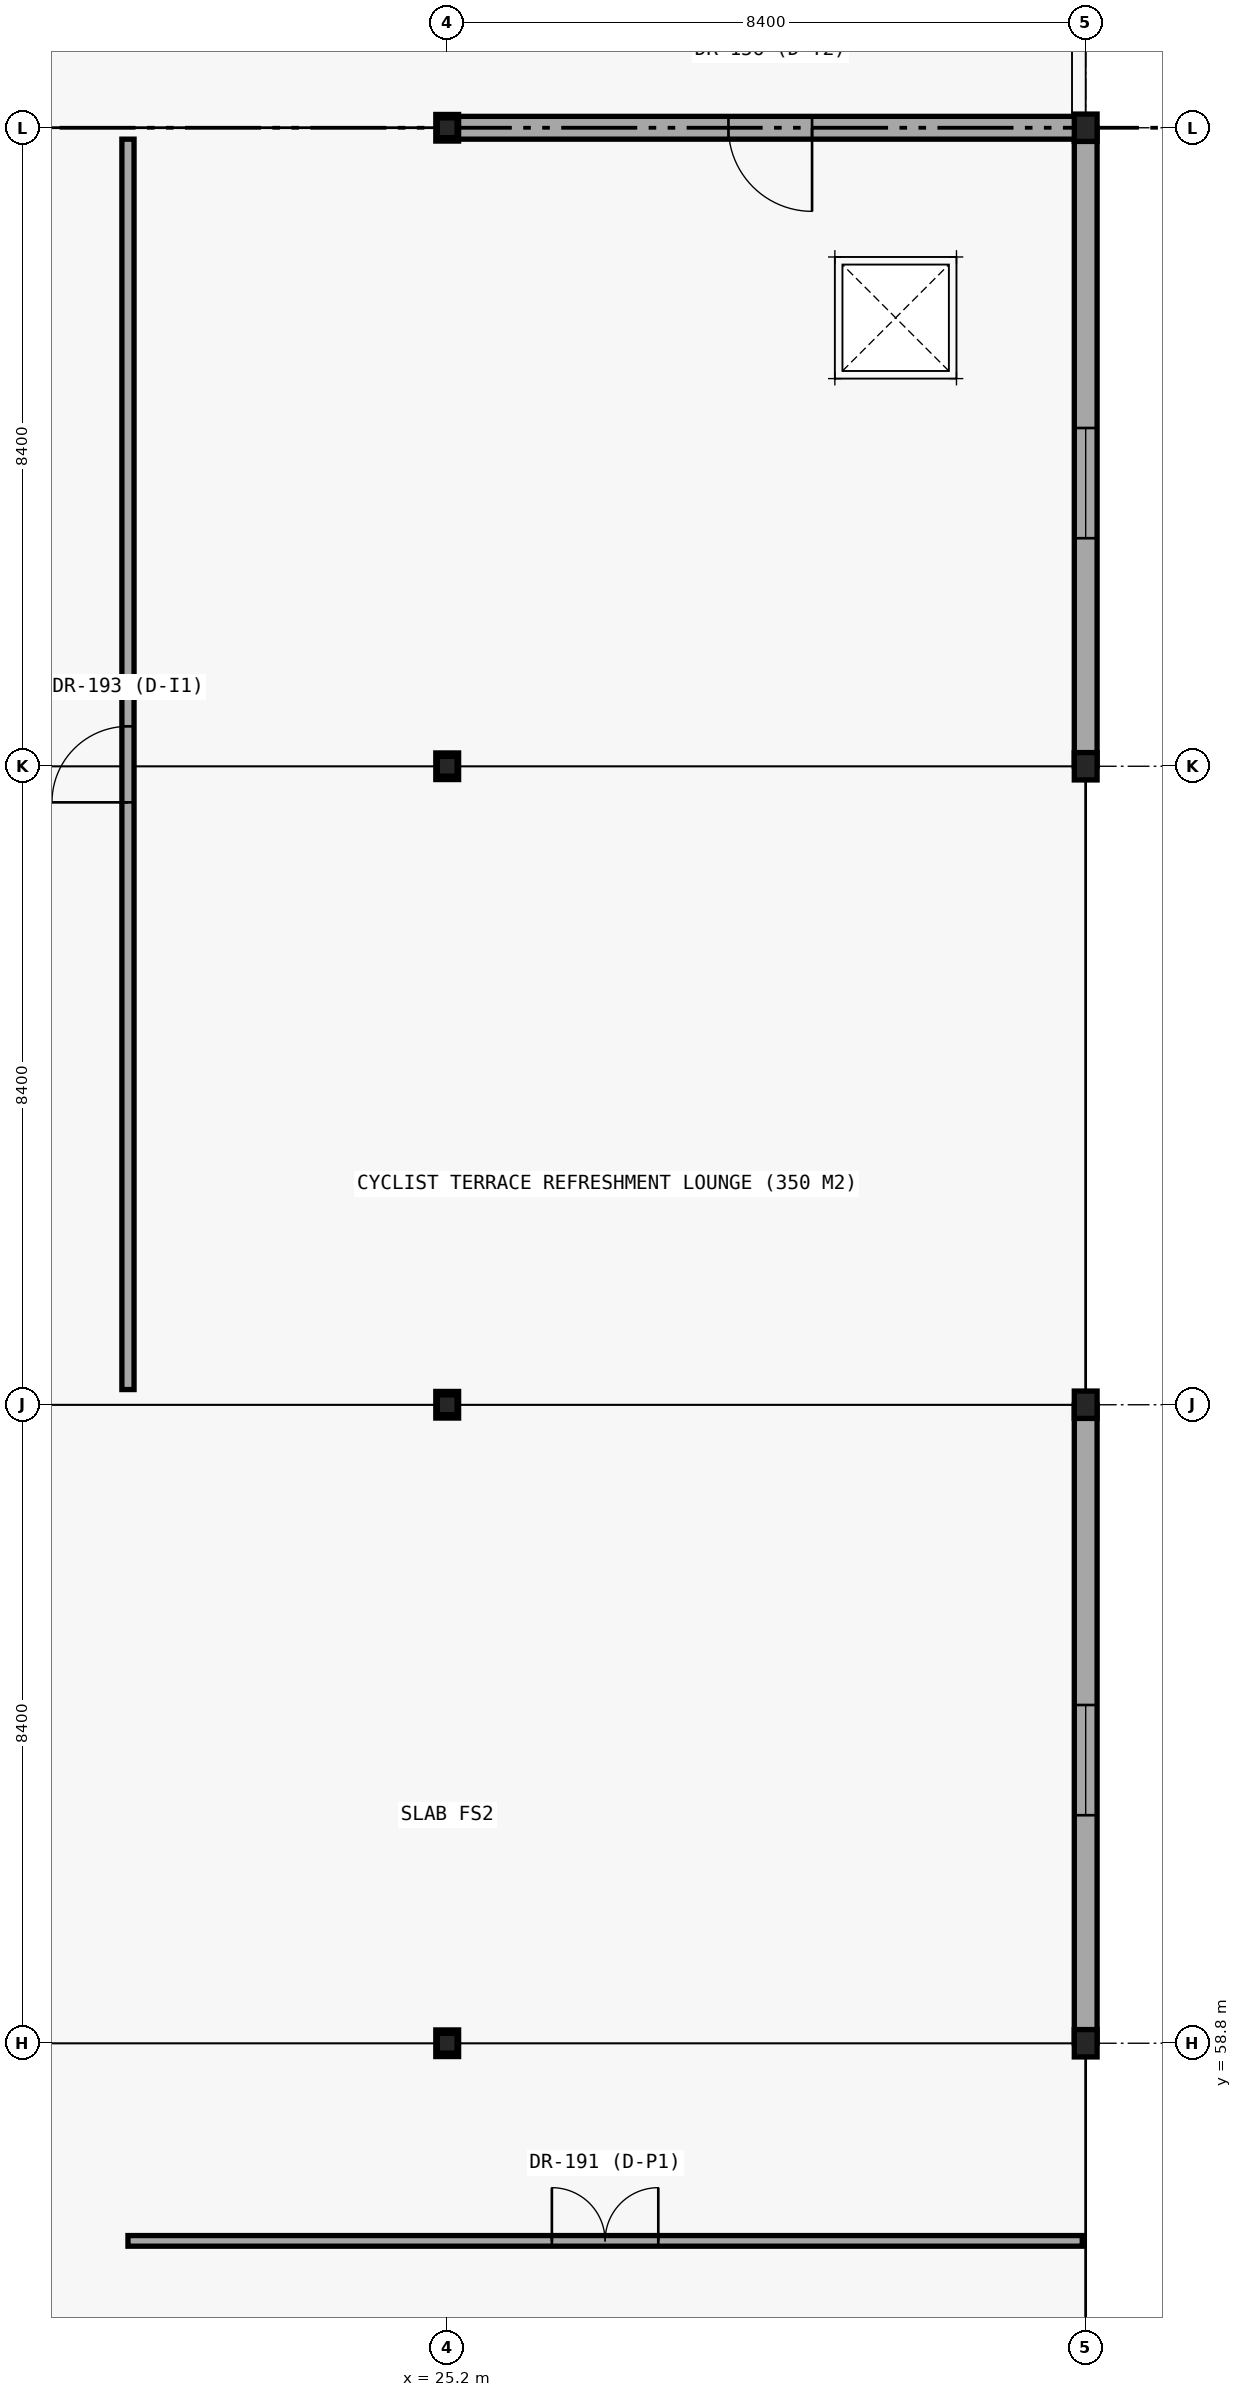
"""IFC4 building model, lengths in metres.
Left out: names, types, materials, properties, quantities, classifications, styles, units other than length and angle.
Written with IfcOpenShell. Run it as: python <this file> out.ifc"""

import sys

from ifc_helpers import new_model, si_unit, direction, frame, frame_2d, origin, origin_2d, place, context, subcontext, project, spatial, rectangle, i_section, extrude, element, fill, save


model = new_model("IFC4")
c1 = context("Model", 3, precision=1e-05, world=origin(), true_north=direction((0.0, 1.0)))
c2 = subcontext(c1, "Body", "Model", "MODEL_VIEW")
j1 = project(units=[si_unit("LENGTHUNIT", "METRE"), si_unit("PLANEANGLEUNIT", "RADIAN")], contexts=[c1])
p1 = place(None, origin())
s1 = spatial("IfcSite", under=j1, at=p1, CompositionType="ELEMENT")
p2 = place(p1, origin())
s2 = spatial("IfcBuilding", under=s1, at=p2, CompositionType="ELEMENT")
p3 = place(p2, frame((0.0, 0.0, 9.0)))
s3 = spatial("IfcBuildingStorey", under=s2, at=p3, CompositionType="ELEMENT", Elevation=9.0)
for number, where, z_axis, x_axis in (
    (1, (25.2, 58.8, 0.0), (0.0, 0.0, 1.0), (1.0, 0.0, 0.0)),
    (2, (25.2, 67.2, 0.0), (0.0, 0.0, 1.0), (1.0, 0.0, 0.0)),
    (3, (25.2, 75.6, 0.0), (0.0, 0.0, 1.0), (1.0, 0.0, 0.0)),
    (4, (25.2, 84.0, 0.0), (0.0, 0.0, 1.0), (1.0, 0.0, 0.0)),
):
    element("IfcColumn", number, at=place(p3, frame(where, z_axis=z_axis, x_axis=x_axis)), inside=s3, PredefinedType="COLUMN", context=c2, shape_type="SweptSolid", body=[
        extrude(i_section(OverallWidth=0.3, OverallDepth=0.35, WebThickness=0.01, FlangeThickness=0.018, FilletRadius=0.027, at=origin_2d()), origin(), (0.0, 0.0, 1.0), 4.03),
    ])
for number, where, z_axis, x_axis in (
    (5, (33.6, 58.8, 0.0), (0.0, 0.0, 1.0), (1.0, 0.0, 0.0)),
    (6, (33.6, 67.2, 0.0), (0.0, 0.0, 1.0), (1.0, 0.0, 0.0)),
    (7, (33.6, 75.6, 0.0), (0.0, 0.0, 1.0), (1.0, 0.0, 0.0)),
    (8, (33.6, 84.0, 0.0), (0.0, 0.0, 1.0), (1.0, 0.0, 0.0)),
):
    element("IfcColumn", number, at=place(p3, frame(where, z_axis=z_axis, x_axis=x_axis)), inside=s3, PredefinedType="COLUMN", context=c2, shape_type="SweptSolid", body=[
        extrude(i_section(OverallWidth=0.3, OverallDepth=0.36, WebThickness=0.012, FlangeThickness=0.022, FilletRadius=0.027, at=origin_2d()), origin(), (0.0, 0.0, 1.0), 4.03),
    ])
for number, where, z_axis, x_axis in (
    (9, (25.2, 58.8, 4.03), (0.0, 0.0, 1.0), (1.0, 0.0, 0.0)),
    (10, (25.2, 67.2, 4.03), (0.0, 0.0, 1.0), (1.0, 0.0, 0.0)),
    (11, (25.2, 75.6, 4.03), (0.0, 0.0, 1.0), (1.0, 0.0, 0.0)),
    (12, (25.2, 84.0, 4.03), (0.0, 0.0, 1.0), (1.0, 0.0, 0.0)),
):
    element("IfcColumn", number, at=place(p3, frame(where, z_axis=z_axis, x_axis=x_axis)), inside=s3, PredefinedType="COLUMN", context=c2, shape_type="SweptSolid", body=[
        extrude(i_section(OverallWidth=0.26, OverallDepth=0.26, WebThickness=0.01, FlangeThickness=0.018, FilletRadius=0.024, at=origin_2d()), origin(), (0.0, 0.0, 1.0), 1.31),
    ])
p4 = place(p3, frame((33.6, 58.8, 0.0), z_axis=(0.0, 0.0, 1.0), x_axis=(0.0, 1.0, 0.0)))
e13 = element("IfcWall", 13, at=p4, inside=s3, PredefinedType="STANDARD", context=c2, shape_type="SweptSolid", body=[
    extrude(rectangle(XDim=8.4, YDim=0.3, at=frame_2d((4.2, 0.0))), origin(), (0.0, 0.0, 1.0), 3.46),
])
p5 = place(p4, frame((3.0, 0.0, 2.1)))
e14 = element("IfcOpeningElement", 14, at=p5, cuts=e13, PredefinedType="OPENING", context=c2, shape_type="SweptSolid", body=[
    extrude(rectangle(XDim=1.45, YDim=0.95, at=frame_2d((0.725, 0.475))), frame((0.0, 0.16, 0.0), z_axis=(0.0, -1.0, 0.0), x_axis=(1.0, 0.0, 0.0)), (0.0, 0.0, 1.0), 0.32),
])
p6 = place(p3, frame((33.6, 75.6, 0.0), z_axis=(0.0, 0.0, 1.0), x_axis=(0.0, 1.0, 0.0)))
e15 = element("IfcWall", 15, at=p6, inside=s3, PredefinedType="STANDARD", context=c2, shape_type="SweptSolid", body=[
    extrude(rectangle(XDim=8.4, YDim=0.3, at=frame_2d((4.2, 0.0))), origin(), (0.0, 0.0, 1.0), 3.46),
])
p7 = place(p6, frame((3.0, 0.0, 2.1)))
e16 = element("IfcOpeningElement", 16, at=p7, cuts=e15, PredefinedType="OPENING", context=c2, shape_type="SweptSolid", body=[
    extrude(rectangle(XDim=1.45, YDim=0.95, at=frame_2d((0.725, 0.475))), frame((0.0, 0.16, 0.0), z_axis=(0.0, -1.0, 0.0), x_axis=(1.0, 0.0, 0.0)), (0.0, 0.0, 1.0), 0.32),
])
p8 = place(p3, frame((33.6, 84.0, 0.0), z_axis=(0.0, 0.0, 1.0), x_axis=(-1.0, 0.0, 0.0)))
e17 = element("IfcWall", 17, at=p8, inside=s3, PredefinedType="STANDARD", context=c2, shape_type="SweptSolid", body=[
    extrude(rectangle(XDim=8.4, YDim=0.3, at=frame_2d((4.2, 0.0))), origin(), (0.0, 0.0, 1.0), 3.46),
])
p9 = place(p8, frame((3.6, 0.0, 0.0)))
e18 = element("IfcOpeningElement", 18, at=p9, cuts=e17, PredefinedType="OPENING", context=c2, shape_type="SweptSolid", body=[
    extrude(rectangle(XDim=1.1, YDim=2.2, at=frame_2d((0.55, 1.1))), frame((0.0, 0.16, 0.0), z_axis=(0.0, -1.0, 0.0), x_axis=(1.0, 0.0, 0.0)), (0.0, 0.0, 1.0), 0.32),
])
p10 = place(p3, frame((21.0, 56.2, 0.0), z_axis=(0.0, 0.0, 1.0), x_axis=(1.0, 0.0, 0.0)))
e19 = element("IfcWall", 19, at=p10, inside=s3, PredefinedType="PARTITIONING", context=c2, shape_type="SweptSolid", body=[
    extrude(rectangle(XDim=12.555, YDim=0.14, at=frame_2d((6.277, 0.0))), origin(), (0.0, 0.0, 1.0), 3.5),
])
p11 = place(p10, frame((5.577, 0.0, 0.0)))
e20 = element("IfcOpeningElement", 20, at=p11, cuts=e19, PredefinedType="OPENING", context=c2, shape_type="SweptSolid", body=[
    extrude(rectangle(XDim=1.4, YDim=2.25, at=frame_2d((0.7, 1.125))), frame((0.0, 0.08, 0.0), z_axis=(0.0, -1.0, 0.0), x_axis=(1.0, 0.0, 0.0)), (0.0, 0.0, 1.0), 0.16),
])
p12 = place(p3, frame((21.0, 67.4, 0.0), z_axis=(0.0, 0.0, 1.0), x_axis=(0.0, 1.0, 0.0)))
e21 = element("IfcWall", 21, at=p12, inside=s3, PredefinedType="PARTITIONING", context=c2, shape_type="SweptSolid", body=[
    extrude(rectangle(XDim=16.45, YDim=0.16, at=frame_2d((8.225, 0.0))), origin(), (0.0, 0.0, 1.0), 3.5),
])
p13 = place(p12, frame((7.725, 0.0, 0.0)))
e22 = element("IfcOpeningElement", 22, at=p13, cuts=e21, PredefinedType="OPENING", context=c2, shape_type="SweptSolid", body=[
    extrude(rectangle(XDim=1.0, YDim=2.15, at=frame_2d((0.5, 1.075))), frame((0.0, 0.09, 0.0), z_axis=(0.0, -1.0, 0.0), x_axis=(1.0, 0.0, 0.0)), (0.0, 0.0, 1.0), 0.18),
])
p14 = place(p5, origin())
e23 = element("IfcWindow", 23, at=p14, inside=s3, PartitioningType="SINGLE_PANEL", PredefinedType="WINDOW", context=c2, shape_type="SweptSolid", body=[
    extrude(rectangle(XDim=1.45, YDim=0.95, at=frame_2d((0.725, 0.475))), frame((0.0, 0.03, 0.0), z_axis=(0.0, -1.0, 0.0), x_axis=(1.0, 0.0, 0.0)), (0.0, 0.0, 1.0), 0.06),
])
fill(e14, e23)
p15 = place(p7, origin())
e24 = element("IfcWindow", 24, at=p15, inside=s3, PartitioningType="SINGLE_PANEL", PredefinedType="WINDOW", context=c2, shape_type="SweptSolid", body=[
    extrude(rectangle(XDim=1.45, YDim=0.95, at=frame_2d((0.725, 0.475))), frame((0.0, 0.03, 0.0), z_axis=(0.0, -1.0, 0.0), x_axis=(1.0, 0.0, 0.0)), (0.0, 0.0, 1.0), 0.06),
])
fill(e16, e24)
p16 = place(p9, origin())
e25 = element("IfcDoor", 25, at=p16, inside=s3, OperationType="SINGLE_SWING_LEFT", PredefinedType="DOOR", context=c2, shape_type="SweptSolid", body=[
    extrude(rectangle(XDim=1.1, YDim=2.2, at=frame_2d((0.55, 1.1))), frame((0.0, 0.025, 0.0), z_axis=(0.0, -1.0, 0.0), x_axis=(1.0, 0.0, 0.0)), (0.0, 0.0, 1.0), 0.05),
])
fill(e18, e25)
p17 = place(p11, origin())
e26 = element("IfcDoor", 26, at=p17, inside=s3, OperationType="DOUBLE_DOOR_SINGLE_SWING", PredefinedType="DOOR", context=c2, shape_type="SweptSolid", body=[
    extrude(rectangle(XDim=1.4, YDim=2.25, at=frame_2d((0.7, 1.125))), frame((0.0, 0.025, 0.0), z_axis=(0.0, -1.0, 0.0), x_axis=(1.0, 0.0, 0.0)), (0.0, 0.0, 1.0), 0.05),
])
fill(e20, e26)
p18 = place(p13, origin())
e27 = element("IfcDoor", 27, at=p18, inside=s3, OperationType="SINGLE_SWING_LEFT", PredefinedType="DOOR", context=c2, shape_type="SweptSolid", body=[
    extrude(rectangle(XDim=1.0, YDim=2.15, at=frame_2d((0.5, 1.075))), frame((0.0, 0.025, 0.0), z_axis=(0.0, -1.0, 0.0), x_axis=(1.0, 0.0, 0.0)), (0.0, 0.0, 1.0), 0.05),
])
fill(e22, e27)
save(model, sys.argv[1])
